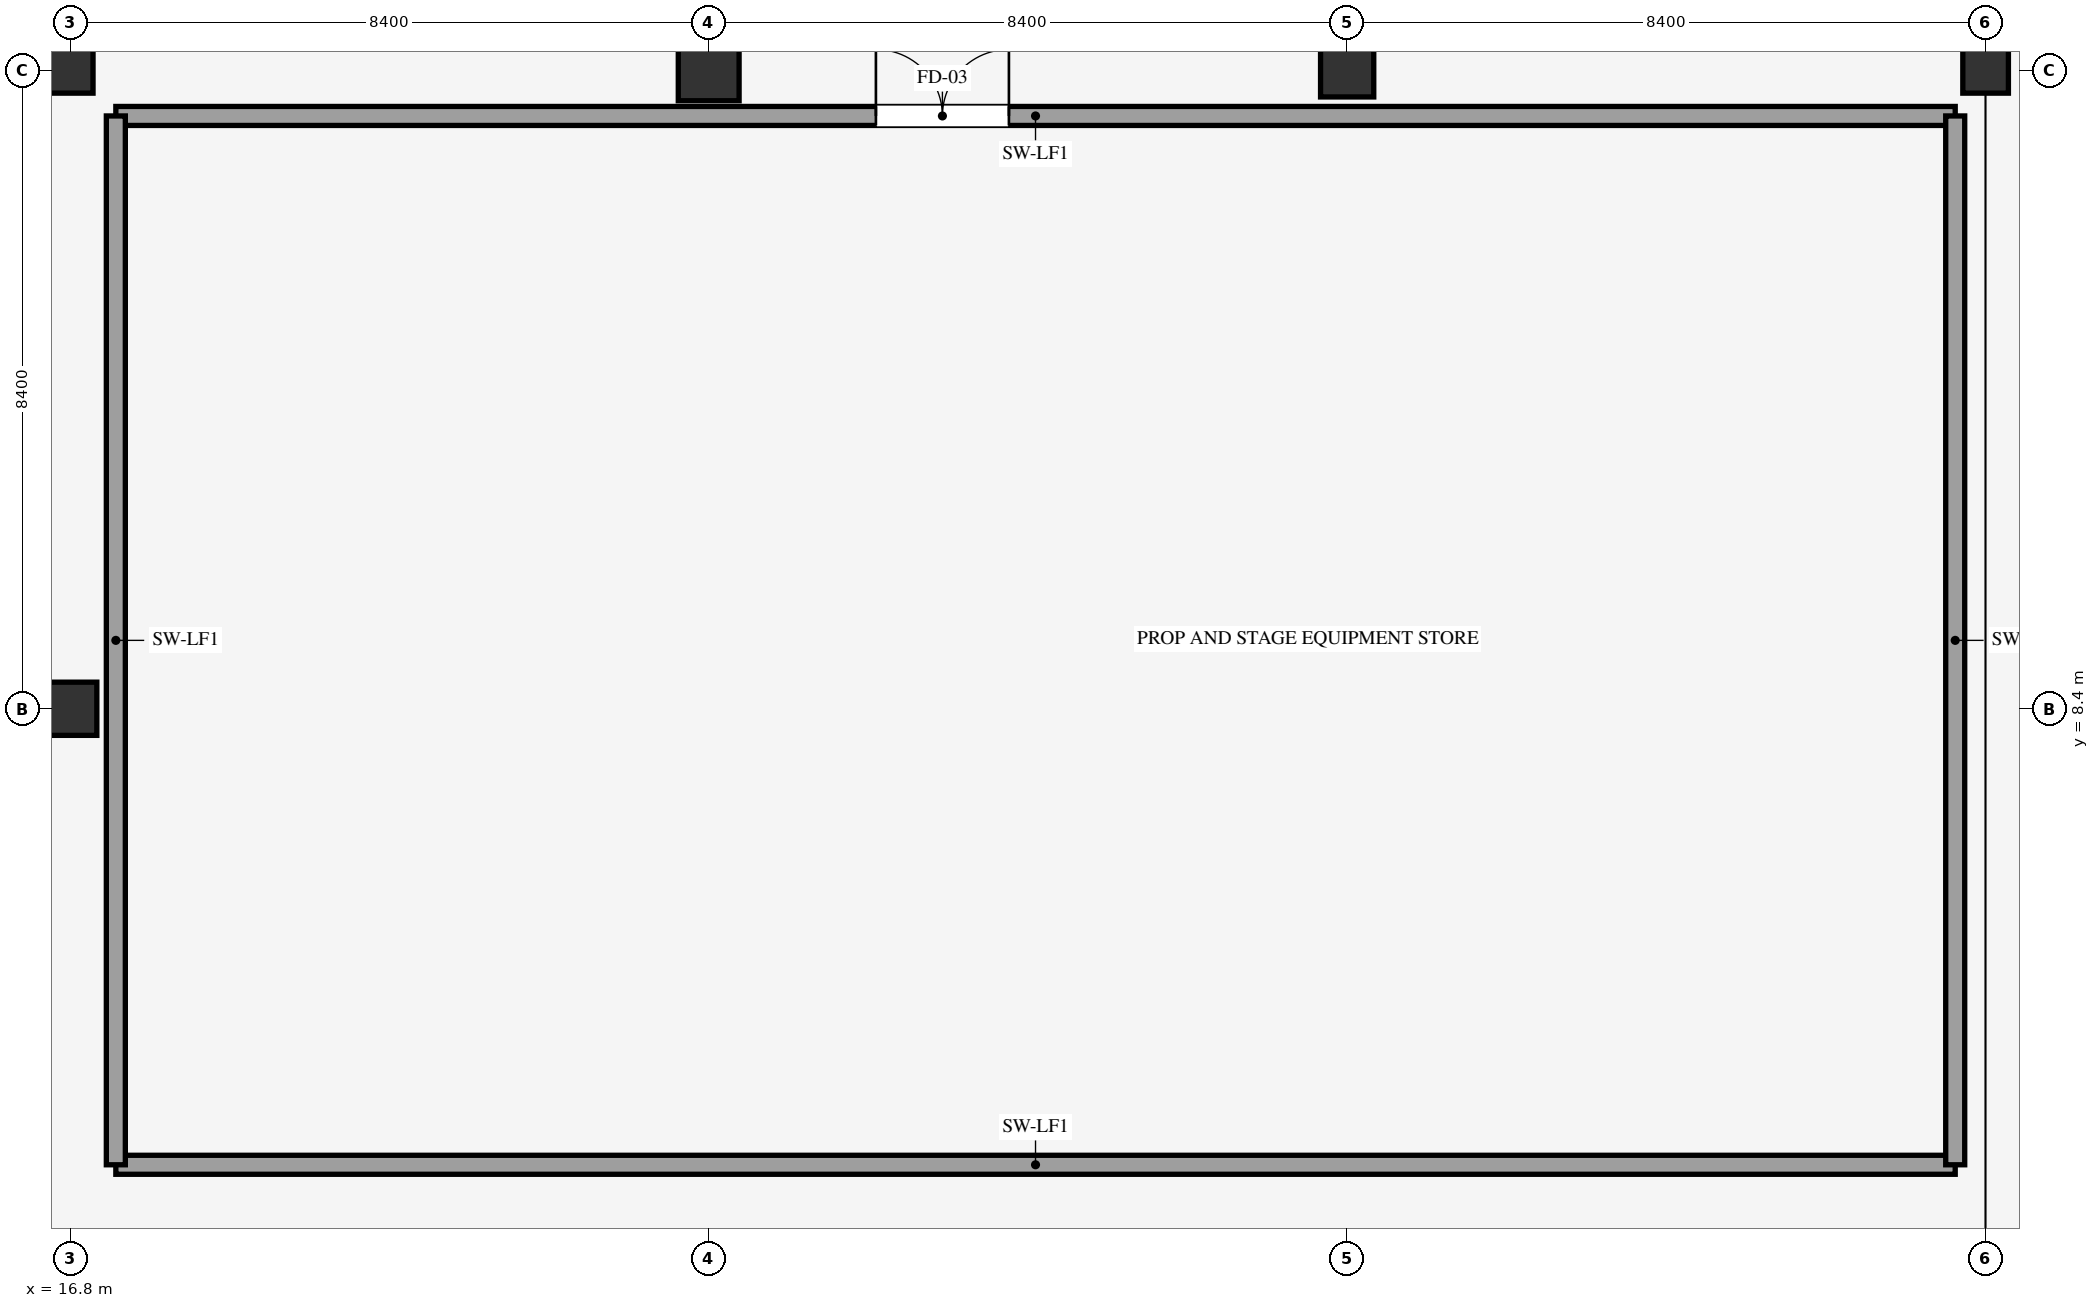
"""IFC4 building model, lengths in metres.
Left out: names, types, materials, properties, quantities, classifications, styles, units other than length and angle.
Written with IfcOpenShell. Run it as: python <this file> out.ifc"""

import sys

from ifc_helpers import new_model, si_unit, direction, frame, frame_2d, origin, origin_2d, place, context, subcontext, project, spatial, rectangle, extrude, element, fill, save


model = new_model("IFC4")
c1 = context("Model", 3, precision=1e-05, world=origin(), true_north=direction((0.0, 1.0)))
c2 = subcontext(c1, "Body", "Model", "MODEL_VIEW")
j1 = project(units=[si_unit("LENGTHUNIT", "METRE"), si_unit("PLANEANGLEUNIT", "RADIAN")], contexts=[c1])
p1 = place(None, origin())
s1 = spatial("IfcSite", under=j1, at=p1, CompositionType="ELEMENT")
p2 = place(p1, origin())
s2 = spatial("IfcBuilding", under=s1, at=p2, CompositionType="ELEMENT")
p3 = place(p2, origin())
s3 = spatial("IfcBuildingStorey", under=s2, at=p3, CompositionType="ELEMENT", Elevation=0.0)
p4 = place(p3, frame((16.8, 8.4, 0.0), z_axis=(0.0, 0.0, 1.0), x_axis=(1.0, 0.0, 0.0)))
e1 = element("IfcColumn", 1, at=p4, inside=s3, PredefinedType="COLUMN", context=c2, shape_type="SweptSolid", body=[
    extrude(rectangle(XDim=0.7, YDim=0.7, at=origin_2d()), origin(), (0.0, 0.0, 1.0), 5.4),
])
p5 = place(p3, frame((16.8, 16.8, 0.0), z_axis=(0.0, 0.0, 1.0), x_axis=(1.0, 0.0, 0.0)))
e2 = element("IfcColumn", 2, at=p5, inside=s3, PredefinedType="COLUMN", context=c2, shape_type="SweptSolid", body=[
    extrude(rectangle(XDim=0.6, YDim=0.6, at=origin_2d()), origin(), (0.0, 0.0, 1.0), 5.4),
])
p6 = place(p3, frame((25.2, 16.8, 0.0), z_axis=(0.0, 0.0, 1.0), x_axis=(1.0, 0.0, 0.0)))
e3 = element("IfcColumn", 3, at=p6, inside=s3, PredefinedType="COLUMN", context=c2, shape_type="SweptSolid", body=[
    extrude(rectangle(XDim=0.8, YDim=0.8, at=origin_2d()), origin(), (0.0, 0.0, 1.0), 5.4),
])
p7 = place(p3, frame((33.6, 16.8, 0.0), z_axis=(0.0, 0.0, 1.0), x_axis=(1.0, 0.0, 0.0)))
e4 = element("IfcColumn", 4, at=p7, inside=s3, PredefinedType="COLUMN", context=c2, shape_type="SweptSolid", body=[
    extrude(rectangle(XDim=0.7, YDim=0.7, at=origin_2d()), origin(), (0.0, 0.0, 1.0), 5.4),
])
p8 = place(p3, frame((42.0, 16.8, 0.0), z_axis=(0.0, 0.0, 1.0), x_axis=(1.0, 0.0, 0.0)))
e5 = element("IfcColumn", 5, at=p8, inside=s3, PredefinedType="COLUMN", context=c2, shape_type="SweptSolid", body=[
    extrude(rectangle(XDim=0.6, YDim=0.6, at=origin_2d()), origin(), (0.0, 0.0, 1.0), 5.4),
])
p9 = place(p3, frame((17.4, 2.4, 0.0), z_axis=(0.0, 0.0, 1.0), x_axis=(1.0, 0.0, 0.0)))
e6 = element("IfcWall", 6, at=p9, inside=s3, PredefinedType="SHEAR", context=c2, shape_type="SweptSolid", body=[
    extrude(rectangle(XDim=24.2, YDim=0.25, at=frame_2d((12.1, 0.0))), origin(), (0.0, 0.0, 1.0), 5.14),
])
p10 = place(p3, frame((17.4, 16.2, 0.0), z_axis=(0.0, 0.0, 1.0), x_axis=(1.0, 0.0, 0.0)))
e7 = element("IfcWall", 7, at=p10, inside=s3, PredefinedType="SHEAR", context=c2, shape_type="SweptSolid", body=[
    extrude(rectangle(XDim=24.2, YDim=0.25, at=frame_2d((12.1, 0.0))), origin(), (0.0, 0.0, 1.0), 5.14),
])
p11 = place(p10, frame((10.0, 0.0, 0.0)))
e8 = element("IfcOpeningElement", 8, at=p11, cuts=e7, PredefinedType="OPENING", context=c2, shape_type="SweptSolid", body=[
    extrude(rectangle(XDim=1.75, YDim=2.2, at=frame_2d((0.875, 1.1))), frame((0.0, 0.135, 0.0), z_axis=(0.0, -1.0, 0.0), x_axis=(1.0, 0.0, 0.0)), (0.0, 0.0, 1.0), 0.27),
])
for number, where, z_axis, x_axis in (
    (9, (17.4, 2.4, 0.0), (0.0, 0.0, 1.0), (0.0, 1.0, 0.0)),
    (10, (41.6, 2.4, 0.0), (0.0, 0.0, 1.0), (0.0, 1.0, 0.0)),
):
    element("IfcWall", number, at=place(p3, frame(where, z_axis=z_axis, x_axis=x_axis)), inside=s3, PredefinedType="SHEAR", context=c2, shape_type="SweptSolid", body=[
        extrude(rectangle(XDim=13.8, YDim=0.25, at=frame_2d((6.9, 0.0))), origin(), (0.0, 0.0, 1.0), 5.14),
    ])
p12 = place(p11, origin())
e11 = element("IfcDoor", 11, at=p12, inside=s3, OperationType="DOUBLE_DOOR_SINGLE_SWING", PredefinedType="DOOR", context=c2, shape_type="SweptSolid", body=[
    extrude(rectangle(XDim=1.75, YDim=2.2, at=frame_2d((0.875, 1.1))), frame((0.0, 0.025, 0.0), z_axis=(0.0, -1.0, 0.0), x_axis=(1.0, 0.0, 0.0)), (0.0, 0.0, 1.0), 0.05),
])
fill(e8, e11)
save(model, sys.argv[1])
